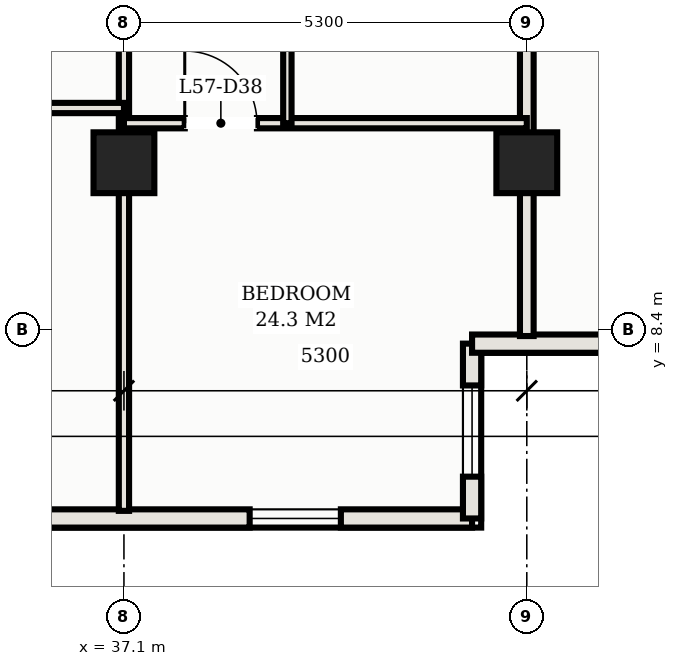
"""IFC4 building model, lengths in metres.
Left out: names, types, materials, properties, quantities, classifications, styles, units other than length and angle.
Written with IfcOpenShell. Run it as: python <this file> out.ifc"""

import sys

from ifc_helpers import new_model, si_unit, direction, frame, frame_2d, origin, origin_2d, place, context, subcontext, project, spatial, rectangle, hollow_rectangle, extrude, element, fill, save


model = new_model("IFC4")
c1 = context("Model", 3, precision=1e-05, world=origin(), true_north=direction((0.0, 1.0)))
c2 = subcontext(c1, "Body", "Model", "MODEL_VIEW")
j1 = project(units=[si_unit("LENGTHUNIT", "METRE"), si_unit("PLANEANGLEUNIT", "RADIAN")], contexts=[c1])
p1 = place(None, origin())
s1 = spatial("IfcSite", under=j1, at=p1, CompositionType="ELEMENT")
p2 = place(p1, origin())
s2 = spatial("IfcBuilding", under=s1, at=p2, CompositionType="ELEMENT")
p3 = place(p2, frame((0.0, 0.0, 209.9)))
s3 = spatial("IfcBuildingStorey", under=s2, at=p3, CompositionType="ELEMENT", Elevation=209.9)
for number, where, z_axis, x_axis in (
    (1, (37.1, 10.6, 0.0), (0.0, 0.0, 1.0), (1.0, 0.0, 0.0)),
    (2, (42.4, 10.6, 0.0), (0.0, 0.0, 1.0), (1.0, 0.0, 0.0)),
):
    element("IfcColumn", number, at=place(p3, frame(where, z_axis=z_axis, x_axis=x_axis)), inside=s3, PredefinedType="COLUMN", context=c2, shape_type="SweptSolid", body=[
        extrude(hollow_rectangle(XDim=0.8, YDim=0.8, WallThickness=0.028, at=origin_2d()), origin(), (0.0, 0.0, 1.0), 3.3),
    ])
p4 = place(p3, frame((33.556, 5.92, 0.0), z_axis=(0.0, 0.0, 1.0), x_axis=(1.0, 0.0, 0.0)))
e3 = element("IfcWall", 3, at=p4, inside=s3, PredefinedType="SOLIDWALL", context=c2, shape_type="SweptSolid", body=[
    extrude(rectangle(XDim=8.124, YDim=0.24, at=frame_2d((4.062, 0.0))), origin(), (0.0, 0.0, 1.0), 3.11),
])
p5 = place(p4, frame((5.198, 0.0, 0.75)))
e4 = element("IfcOpeningElement", 4, at=p5, cuts=e3, PredefinedType="OPENING", context=c2, shape_type="SweptSolid", body=[
    extrude(rectangle(XDim=1.2, YDim=1.5, at=frame_2d((0.6, 0.75))), frame((0.0, 0.13, 0.0), z_axis=(0.0, -1.0, 0.0), x_axis=(1.0, 0.0, 0.0)), (0.0, 0.0, 1.0), 0.26),
])
p6 = place(p4, frame((1.208, 0.0, 0.75)))
e5 = element("IfcOpeningElement", 5, at=p6, cuts=e3, PredefinedType="OPENING", context=c2, shape_type="SweptSolid", body=[
    extrude(rectangle(XDim=1.2, YDim=1.5, at=frame_2d((0.6, 0.75))), frame((0.0, 0.13, 0.0), z_axis=(0.0, -1.0, 0.0), x_axis=(1.0, 0.0, 0.0)), (0.0, 0.0, 1.0), 0.26),
])
p7 = place(p3, frame((41.68, 5.92, 0.0), z_axis=(0.0, 0.0, 1.0), x_axis=(0.0, 1.0, 0.0)))
e6 = element("IfcWall", 6, at=p7, inside=s3, PredefinedType="SOLIDWALL", context=c2, shape_type="SweptSolid", body=[
    extrude(rectangle(XDim=2.3, YDim=0.24, at=frame_2d((1.15, 0.0))), origin(), (0.0, 0.0, 1.0), 3.11),
])
p8 = place(p7, frame((0.55, 0.0, 0.75)))
e7 = element("IfcOpeningElement", 7, at=p8, cuts=e6, PredefinedType="OPENING", context=c2, shape_type="SweptSolid", body=[
    extrude(rectangle(XDim=1.2, YDim=1.5, at=frame_2d((0.6, 0.75))), frame((0.0, 0.13, 0.0), z_axis=(0.0, -1.0, 0.0), x_axis=(1.0, 0.0, 0.0)), (0.0, 0.0, 1.0), 0.26),
])
p9 = place(p3, frame((41.68, 8.22, 0.0), z_axis=(0.0, 0.0, 1.0), x_axis=(1.0, 0.0, 0.0)))
e8 = element("IfcWall", 8, at=p9, inside=s3, PredefinedType="SOLIDWALL", context=c2, shape_type="SweptSolid", body=[
    extrude(rectangle(XDim=2.3, YDim=0.24, at=frame_2d((1.15, 0.0))), origin(), (0.0, 0.0, 1.0), 3.11),
])
p10 = place(p3, frame((42.4, 8.32, 0.0), z_axis=(0.0, 0.0, 1.0), x_axis=(0.0, 1.0, 0.0)))
e9 = element("IfcWall", 9, at=p10, inside=s3, PredefinedType="PARTITIONING", context=c2, shape_type="SweptSolid", body=[
    extrude(rectangle(XDim=15.23, YDim=0.18, at=frame_2d((7.615, 0.0))), origin(), (0.0, 0.0, 1.0), 2.43),
])
p11 = place(p3, frame((37.1, 6.02, 0.0), z_axis=(0.0, 0.0, 1.0), x_axis=(0.0, 1.0, 0.0)))
e10 = element("IfcWall", 10, at=p11, inside=s3, PredefinedType="PARTITIONING", context=c2, shape_type="SweptSolid", body=[
    extrude(rectangle(XDim=17.53, YDim=0.135, at=frame_2d((8.765, 0.0))), origin(), (0.0, 0.0, 1.0), 2.43),
])
p12 = place(p11, frame((15.745, 0.0, 0.0)))
e11 = element("IfcOpeningElement", 11, at=p12, cuts=e10, PredefinedType="OPENING", context=c2, shape_type="SweptSolid", body=[
    extrude(rectangle(XDim=0.92, YDim=2.15, at=frame_2d((0.46, 1.075))), frame((0.0, 0.078, 0.0), z_axis=(0.0, -1.0, 0.0), x_axis=(1.0, 0.0, 0.0)), (0.0, 0.0, 1.0), 0.155),
])
p13 = place(p3, frame((31.8, 11.32, 0.0), z_axis=(0.0, 0.0, 1.0), x_axis=(1.0, 0.0, 0.0)))
e12 = element("IfcWall", 12, at=p13, inside=s3, PredefinedType="PARTITIONING", context=c2, shape_type="SweptSolid", body=[
    extrude(rectangle(XDim=5.3, YDim=0.135, at=frame_2d((2.65, 0.0))), origin(), (0.0, 0.0, 1.0), 2.43),
])
p14 = place(p13, frame((0.8, 0.0, 0.0)))
e13 = element("IfcOpeningElement", 13, at=p14, cuts=e12, PredefinedType="OPENING", context=c2, shape_type="SweptSolid", body=[
    extrude(rectangle(XDim=0.95, YDim=2.15, at=frame_2d((0.475, 1.075))), frame((0.0, 0.078, 0.0), z_axis=(0.0, -1.0, 0.0), x_axis=(1.0, 0.0, 0.0)), (0.0, 0.0, 1.0), 0.155),
])
p15 = place(p13, frame((2.875, 0.0, 0.0)))
e14 = element("IfcOpeningElement", 14, at=p15, cuts=e12, PredefinedType="OPENING", context=c2, shape_type="SweptSolid", body=[
    extrude(rectangle(XDim=0.9, YDim=2.15, at=frame_2d((0.45, 1.075))), frame((0.0, 0.078, 0.0), z_axis=(0.0, -1.0, 0.0), x_axis=(1.0, 0.0, 0.0)), (0.0, 0.0, 1.0), 0.155),
])
p16 = place(p3, frame((37.1, 11.12, 0.0), z_axis=(0.0, 0.0, 1.0), x_axis=(1.0, 0.0, 0.0)))
e15 = element("IfcWall", 15, at=p16, inside=s3, PredefinedType="PARTITIONING", context=c2, shape_type="SweptSolid", body=[
    extrude(rectangle(XDim=5.3, YDim=0.135, at=frame_2d((2.65, 0.0))), origin(), (0.0, 0.0, 1.0), 2.43),
])
p17 = place(p16, frame((0.8, 0.0, 0.0)))
e16 = element("IfcOpeningElement", 16, at=p17, cuts=e15, PredefinedType="OPENING", context=c2, shape_type="SweptSolid", body=[
    extrude(rectangle(XDim=0.95, YDim=2.15, at=frame_2d((0.475, 1.075))), frame((0.0, 0.078, 0.0), z_axis=(0.0, -1.0, 0.0), x_axis=(1.0, 0.0, 0.0)), (0.0, 0.0, 1.0), 0.155),
])
p18 = place(p3, frame((39.25, 11.12, 0.0), z_axis=(0.0, 0.0, 1.0), x_axis=(0.0, 1.0, 0.0)))
e17 = element("IfcWall", 17, at=p18, inside=s3, PredefinedType="MOVABLE", context=c2, shape_type="SweptSolid", body=[
    extrude(rectangle(XDim=12.43, YDim=0.11, at=frame_2d((6.215, 0.0))), origin(), (0.0, 0.0, 1.0), 2.43),
])
p19 = place(p18, frame((2.647, 0.0, 0.0)))
e18 = element("IfcOpeningElement", 18, at=p19, cuts=e17, PredefinedType="OPENING", context=c2, shape_type="SweptSolid", body=[
    extrude(rectangle(XDim=0.92, YDim=2.15, at=frame_2d((0.46, 1.075))), frame((0.0, 0.065, 0.0), z_axis=(0.0, -1.0, 0.0), x_axis=(1.0, 0.0, 0.0)), (0.0, 0.0, 1.0), 0.13),
])
p20 = place(p18, frame((8.863, 0.0, 0.0)))
e19 = element("IfcOpeningElement", 19, at=p20, cuts=e17, PredefinedType="OPENING", context=c2, shape_type="SweptSolid", body=[
    extrude(rectangle(XDim=0.92, YDim=2.15, at=frame_2d((0.46, 1.075))), frame((0.0, 0.065, 0.0), z_axis=(0.0, -1.0, 0.0), x_axis=(1.0, 0.0, 0.0)), (0.0, 0.0, 1.0), 0.13),
])
p21 = place(p5, origin())
e20 = element("IfcWindow", 20, at=p21, inside=s3, PartitioningType="SINGLE_PANEL", PredefinedType="WINDOW", context=c2, shape_type="SweptSolid", body=[
    extrude(rectangle(XDim=1.2, YDim=1.5, at=frame_2d((0.6, 0.75))), frame((0.0, 0.03, 0.0), z_axis=(0.0, -1.0, 0.0), x_axis=(1.0, 0.0, 0.0)), (0.0, 0.0, 1.0), 0.06),
])
fill(e4, e20)
p22 = place(p8, origin())
e21 = element("IfcWindow", 21, at=p22, inside=s3, PartitioningType="SINGLE_PANEL", PredefinedType="WINDOW", context=c2, shape_type="SweptSolid", body=[
    extrude(rectangle(XDim=1.2, YDim=1.5, at=frame_2d((0.6, 0.75))), frame((0.0, 0.03, 0.0), z_axis=(0.0, -1.0, 0.0), x_axis=(1.0, 0.0, 0.0)), (0.0, 0.0, 1.0), 0.06),
])
fill(e7, e21)
p23 = place(p17, origin())
e22 = element("IfcDoor", 22, at=p23, inside=s3, OperationType="SINGLE_SWING_LEFT", PredefinedType="DOOR", context=c2, shape_type="SweptSolid", body=[
    extrude(rectangle(XDim=0.95, YDim=2.15, at=frame_2d((0.475, 1.075))), frame((0.0, 0.025, 0.0), z_axis=(0.0, -1.0, 0.0), x_axis=(1.0, 0.0, 0.0)), (0.0, 0.0, 1.0), 0.05),
])
fill(e16, e22)
save(model, sys.argv[1])
